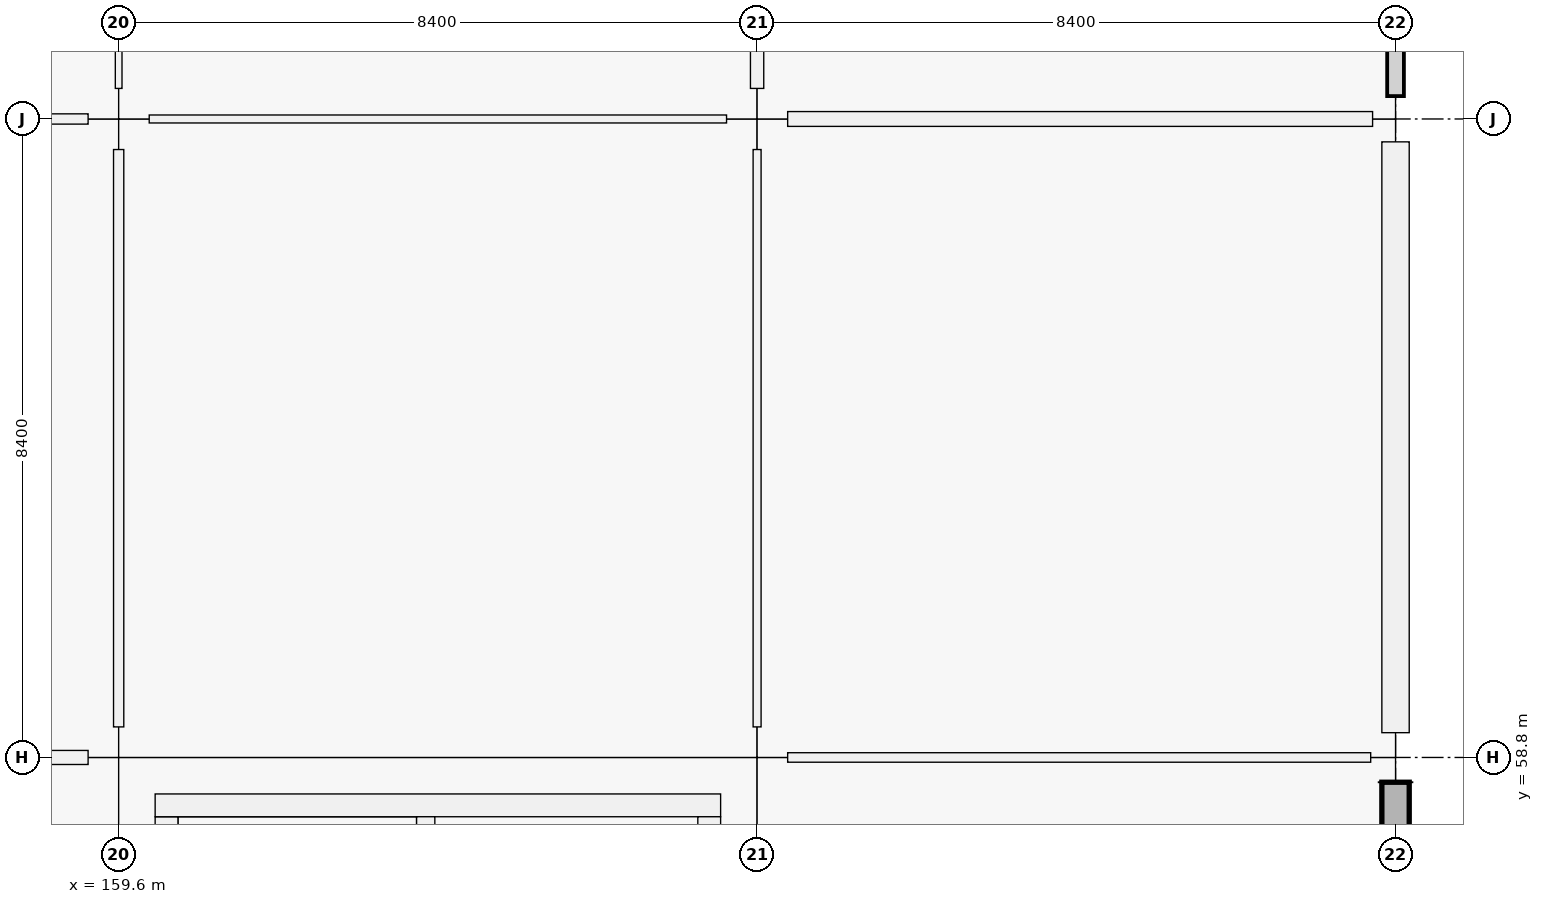
"""IFC4 building model, lengths in metres.
Left out: names, types, materials, properties, quantities, classifications, styles, units other than length and angle.
Written with IfcOpenShell. Run it as: python <this file> out.ifc"""

import sys

from ifc_helpers import new_model, si_unit, direction, frame, frame_2d, origin, origin_2d, place, context, subcontext, project, spatial, rectangle, extrude, element, fill, save


model = new_model("IFC4")
c1 = context("Model", 3, precision=1e-05, world=origin(), true_north=direction((0.0, 1.0)))
c2 = subcontext(c1, "Body", "Model", "MODEL_VIEW")
j1 = project(units=[si_unit("LENGTHUNIT", "METRE"), si_unit("PLANEANGLEUNIT", "RADIAN")], contexts=[c1])
p1 = place(None, origin())
s1 = spatial("IfcSite", under=j1, at=p1, CompositionType="ELEMENT")
p2 = place(p1, origin())
s2 = spatial("IfcBuilding", under=s1, at=p2, CompositionType="ELEMENT")
p3 = place(p2, origin())
s3 = spatial("IfcBuildingStorey", under=s2, at=p3, CompositionType="ELEMENT", Elevation=0.0)
for number, where, z_axis, x_axis in (
    (1, (159.6, 58.8, 0.0), (0.0, 0.0, 1.0), (1.0, 0.0, 0.0)),
    (2, (159.6, 67.2, 0.0), (0.0, 0.0, 1.0), (1.0, 0.0, 0.0)),
    (3, (168.0, 58.8, 0.0), (0.0, 0.0, 1.0), (1.0, 0.0, 0.0)),
    (4, (168.0, 67.2, 0.0), (0.0, 0.0, 1.0), (1.0, 0.0, 0.0)),
):
    element("IfcColumn", number, at=place(p3, frame(where, z_axis=z_axis, x_axis=x_axis)), inside=s3, PredefinedType="COLUMN", context=c2, shape_type="SweptSolid", body=[
        extrude(rectangle(XDim=0.8, YDim=0.8, at=origin_2d()), origin(), (0.0, 0.0, 1.0), 5.76),
    ])
p4 = place(p3, frame((176.4, 58.8, 0.0), z_axis=(0.0, 0.0, 1.0), x_axis=(1.0, 0.0, 0.0)))
e5 = element("IfcColumn", 5, at=p4, inside=s3, PredefinedType="COLUMN", context=c2, shape_type="SweptSolid", body=[
    extrude(rectangle(XDim=0.65, YDim=0.65, at=origin_2d()), origin(), (0.0, 0.0, 1.0), 5.76),
])
p5 = place(p3, frame((176.4, 67.2, 0.0), z_axis=(0.0, 0.0, 1.0), x_axis=(1.0, 0.0, 0.0)))
e6 = element("IfcColumn", 6, at=p5, inside=s3, PredefinedType="COLUMN", context=c2, shape_type="SweptSolid", body=[
    extrude(rectangle(XDim=0.6, YDim=0.6, at=origin_2d()), origin(), (0.0, 0.0, 1.0), 5.76),
])
p6 = place(p3, frame((176.4, 58.474, 0.0), z_axis=(0.0, 0.0, 1.0), x_axis=(0.0, -1.0, 0.0)))
e7 = element("IfcWall", 7, at=p6, inside=s3, PredefinedType="SOLIDWALL", context=c2, shape_type="SweptSolid", body=[
    extrude(rectangle(XDim=7.773, YDim=0.36, at=frame_2d((3.887, 0.0))), origin(), (0.0, 0.0, 1.0), 4.7),
])
p7 = place(p6, frame((2.886, 0.0, 0.0)))
e8 = element("IfcOpeningElement", 8, at=p7, cuts=e7, PredefinedType="OPENING", context=c2, shape_type="SweptSolid", body=[
    extrude(rectangle(XDim=2.0, YDim=2.25, at=frame_2d((1.0, 1.125))), frame((0.0, 0.18, 0.0), z_axis=(0.0, -1.0, 0.0), x_axis=(1.0, 0.0, 0.0)), (0.0, 0.0, 1.0), 0.36),
])
p8 = place(p6, frame((5.624, 0.0, 0.0)))
e9 = element("IfcOpeningElement", 9, at=p8, cuts=e7, PredefinedType="OPENING", context=c2, shape_type="SweptSolid", body=[
    extrude(rectangle(XDim=2.0, YDim=2.25, at=frame_2d((1.0, 1.125))), frame((0.0, 0.18, 0.0), z_axis=(0.0, -1.0, 0.0), x_axis=(1.0, 0.0, 0.0)), (0.0, 0.0, 1.0), 0.36),
])
p9 = place(p3, frame((176.4, 66.899, 0.0), z_axis=(0.0, 0.0, 1.0), x_axis=(0.0, -1.0, 0.0)))
e10 = element("IfcWall", 10, at=p9, inside=s3, PredefinedType="SOLIDWALL", context=c2, shape_type="SweptSolid", body=[
    extrude(rectangle(XDim=7.773, YDim=0.36, at=frame_2d((3.886, 0.0))), origin(), (0.0, 0.0, 1.0), 4.7),
])
p10 = place(p9, frame((3.286, 0.0, 0.9)))
e11 = element("IfcOpeningElement", 11, at=p10, cuts=e10, PredefinedType="OPENING", context=c2, shape_type="SweptSolid", body=[
    extrude(rectangle(XDim=1.2, YDim=2.1, at=frame_2d((0.6, 1.05))), frame((0.0, 0.18, 0.0), z_axis=(0.0, -1.0, 0.0), x_axis=(1.0, 0.0, 0.0)), (0.0, 0.0, 1.0), 0.36),
])
p11 = place(p3, frame((160.23, 51.18, 0.0), z_axis=(0.0, 0.0, 1.0), x_axis=(0.0, 1.0, 0.0)))
e12 = element("IfcWall", 12, at=p11, inside=s3, PredefinedType="SHEAR", context=c2, shape_type="SweptSolid", body=[
    extrude(rectangle(XDim=6.84, YDim=0.3, at=frame_2d((3.42, 0.0))), origin(), (0.0, 0.0, 1.0), 5.76),
])
p12 = place(p3, frame((160.08, 58.17, 0.0), z_axis=(0.0, 0.0, 1.0), x_axis=(1.0, 0.0, 0.0)))
e13 = element("IfcWall", 13, at=p12, inside=s3, PredefinedType="SHEAR", context=c2, shape_type="SweptSolid", body=[
    extrude(rectangle(XDim=7.44, YDim=0.3, at=frame_2d((3.72, 0.0))), origin(), (0.0, 0.0, 1.0), 5.76),
])
p13 = place(p3, frame((167.37, 58.02, 0.0), z_axis=(0.0, 0.0, 1.0), x_axis=(0.0, -1.0, 0.0)))
e14 = element("IfcWall", 14, at=p13, inside=s3, PredefinedType="SHEAR", context=c2, shape_type="SweptSolid", body=[
    extrude(rectangle(XDim=6.84, YDim=0.3, at=frame_2d((3.42, 0.0))), origin(), (0.0, 0.0, 1.0), 5.76),
])
p14 = place(p13, frame((5.12, 0.0, 0.0)))
e15 = element("IfcOpeningElement", 15, at=p14, cuts=e14, PredefinedType="OPENING", context=c2, shape_type="SweptSolid", body=[
    extrude(rectangle(XDim=1.5, YDim=2.15, at=frame_2d((0.75, 1.075))), frame((0.0, 0.15, 0.0), z_axis=(0.0, -1.0, 0.0), x_axis=(1.0, 0.0, 0.0)), (0.0, 0.0, 1.0), 0.3),
])
p15 = place(p3, frame((163.64, 51.18, 0.0), z_axis=(0.0, 0.0, 1.0), x_axis=(0.0, 1.0, 0.0)))
e16 = element("IfcWall", 16, at=p15, inside=s3, PredefinedType="SHEAR", context=c2, shape_type="SweptSolid", body=[
    extrude(rectangle(XDim=6.84, YDim=0.24, at=frame_2d((3.42, 0.0))), origin(), (0.0, 0.0, 1.0), 5.76),
])
p16 = place(p15, frame((0.12, 0.0, 0.0)))
e17 = element("IfcOpeningElement", 17, at=p16, cuts=e16, PredefinedType="OPENING", context=c2, shape_type="SweptSolid", body=[
    extrude(rectangle(XDim=1.0, YDim=2.15, at=frame_2d((0.5, 1.075))), frame((0.0, 0.12, 0.0), z_axis=(0.0, -1.0, 0.0), x_axis=(1.0, 0.0, 0.0)), (0.0, 0.0, 1.0), 0.24),
])
p17 = place(p3, frame((151.602, 58.8, 0.0), z_axis=(0.0, 0.0, 1.0), x_axis=(1.0, 0.0, 0.0)))
e18 = element("IfcWall", 18, at=p17, inside=s3, PredefinedType="PARTITIONING", context=c2, shape_type="SweptSolid", body=[
    extrude(rectangle(XDim=7.596, YDim=0.185, at=frame_2d((3.798, 0.0))), origin(), (0.0, 0.0, 1.0), 3.66),
])
p18 = place(p17, frame((3.318, 0.0, 0.0)))
e19 = element("IfcOpeningElement", 19, at=p18, cuts=e18, PredefinedType="OPENING", context=c2, shape_type="SweptSolid", body=[
    extrude(rectangle(XDim=0.96, YDim=2.18, at=frame_2d((0.48, 1.09))), frame((0.0, 0.093, 0.0), z_axis=(0.0, -1.0, 0.0), x_axis=(1.0, 0.0, 0.0)), (0.0, 0.0, 1.0), 0.185),
])
p19 = place(p3, frame((151.602, 67.2, 0.0), z_axis=(0.0, 0.0, 1.0), x_axis=(1.0, 0.0, 0.0)))
e20 = element("IfcWall", 20, at=p19, inside=s3, PredefinedType="PARTITIONING", context=c2, shape_type="SweptSolid", body=[
    extrude(rectangle(XDim=7.596, YDim=0.135, at=frame_2d((3.798, 0.0))), origin(), (0.0, 0.0, 1.0), 3.66),
])
p20 = place(p19, frame((3.328, 0.0, 0.0)))
e21 = element("IfcOpeningElement", 21, at=p20, cuts=e20, PredefinedType="OPENING", context=c2, shape_type="SweptSolid", body=[
    extrude(rectangle(XDim=0.94, YDim=2.15, at=frame_2d((0.47, 1.075))), frame((0.0, 0.067, 0.0), z_axis=(0.0, -1.0, 0.0), x_axis=(1.0, 0.0, 0.0)), (0.0, 0.0, 1.0), 0.135),
])
p21 = place(p3, frame((160.002, 67.2, 0.0), z_axis=(0.0, 0.0, 1.0), x_axis=(1.0, 0.0, 0.0)))
e22 = element("IfcWall", 22, at=p21, inside=s3, PredefinedType="PARTITIONING", context=c2, shape_type="SweptSolid", body=[
    extrude(rectangle(XDim=7.596, YDim=0.105, at=frame_2d((3.798, 0.0))), origin(), (0.0, 0.0, 1.0), 3.66),
])
p22 = place(p21, frame((3.273, 0.0, 0.0)))
e23 = element("IfcOpeningElement", 23, at=p22, cuts=e22, PredefinedType="OPENING", context=c2, shape_type="SweptSolid", body=[
    extrude(rectangle(XDim=1.05, YDim=2.12, at=frame_2d((0.525, 1.06))), frame((0.0, 0.052, 0.0), z_axis=(0.0, -1.0, 0.0), x_axis=(1.0, 0.0, 0.0)), (0.0, 0.0, 1.0), 0.105),
])
p23 = place(p3, frame((168.402, 58.8, 0.0), z_axis=(0.0, 0.0, 1.0), x_axis=(1.0, 0.0, 0.0)))
e24 = element("IfcWall", 24, at=p23, inside=s3, PredefinedType="PARTITIONING", context=c2, shape_type="SweptSolid", body=[
    extrude(rectangle(XDim=7.671, YDim=0.125, at=frame_2d((3.835, 0.0))), origin(), (0.0, 0.0, 1.0), 3.66),
])
p24 = place(p23, frame((3.306, 0.0, 0.0)))
e25 = element("IfcOpeningElement", 25, at=p24, cuts=e24, PredefinedType="OPENING", context=c2, shape_type="SweptSolid", body=[
    extrude(rectangle(XDim=1.06, YDim=2.25, at=frame_2d((0.53, 1.125))), frame((0.0, 0.062, 0.0), z_axis=(0.0, -1.0, 0.0), x_axis=(1.0, 0.0, 0.0)), (0.0, 0.0, 1.0), 0.125),
])
p25 = place(p3, frame((168.402, 67.2, 0.0), z_axis=(0.0, 0.0, 1.0), x_axis=(1.0, 0.0, 0.0)))
e26 = element("IfcWall", 26, at=p25, inside=s3, PredefinedType="PARTITIONING", context=c2, shape_type="SweptSolid", body=[
    extrude(rectangle(XDim=7.696, YDim=0.195, at=frame_2d((3.848, 0.0))), origin(), (0.0, 0.0, 1.0), 3.66),
])
p26 = place(p25, frame((3.328, 0.0, 0.0)))
e27 = element("IfcOpeningElement", 27, at=p26, cuts=e26, PredefinedType="OPENING", context=c2, shape_type="SweptSolid", body=[
    extrude(rectangle(XDim=1.04, YDim=2.2, at=frame_2d((0.52, 1.1))), frame((0.0, 0.098, 0.0), z_axis=(0.0, -1.0, 0.0), x_axis=(1.0, 0.0, 0.0)), (0.0, 0.0, 1.0), 0.195),
])
p27 = place(p3, frame((159.6, 59.202, 0.0), z_axis=(0.0, 0.0, 1.0), x_axis=(0.0, 1.0, 0.0)))
e28 = element("IfcWall", 28, at=p27, inside=s3, PredefinedType="PARTITIONING", context=c2, shape_type="SweptSolid", body=[
    extrude(rectangle(XDim=7.596, YDim=0.135, at=frame_2d((3.798, 0.0))), origin(), (0.0, 0.0, 1.0), 3.66),
])
p28 = place(p27, frame((3.288, 0.0, 0.0)))
e29 = element("IfcOpeningElement", 29, at=p28, cuts=e28, PredefinedType="OPENING", context=c2, shape_type="SweptSolid", body=[
    extrude(rectangle(XDim=1.02, YDim=2.2, at=frame_2d((0.51, 1.1))), frame((0.0, 0.067, 0.0), z_axis=(0.0, -1.0, 0.0), x_axis=(1.0, 0.0, 0.0)), (0.0, 0.0, 1.0), 0.135),
])
p29 = place(p3, frame((159.6, 67.602, 0.0), z_axis=(0.0, 0.0, 1.0), x_axis=(0.0, 1.0, 0.0)))
e30 = element("IfcWall", 30, at=p29, inside=s3, PredefinedType="PARTITIONING", context=c2, shape_type="SweptSolid", body=[
    extrude(rectangle(XDim=7.671, YDim=0.088, at=frame_2d((3.835, 0.0))), origin(), (0.0, 0.0, 1.0), 3.66),
])
p30 = place(p29, frame((3.331, 0.0, 0.0)))
e31 = element("IfcOpeningElement", 31, at=p30, cuts=e30, PredefinedType="OPENING", context=c2, shape_type="SweptSolid", body=[
    extrude(rectangle(XDim=1.01, YDim=2.12, at=frame_2d((0.505, 1.06))), frame((0.0, 0.044, 0.0), z_axis=(0.0, -1.0, 0.0), x_axis=(1.0, 0.0, 0.0)), (0.0, 0.0, 1.0), 0.088),
])
p31 = place(p3, frame((168.0, 59.202, 0.0), z_axis=(0.0, 0.0, 1.0), x_axis=(0.0, 1.0, 0.0)))
e32 = element("IfcWall", 32, at=p31, inside=s3, PredefinedType="PARTITIONING", context=c2, shape_type="SweptSolid", body=[
    extrude(rectangle(XDim=7.596, YDim=0.105, at=frame_2d((3.798, 0.0))), origin(), (0.0, 0.0, 1.0), 3.66),
])
p32 = place(p31, frame((3.258, 0.0, 0.0)))
e33 = element("IfcOpeningElement", 33, at=p32, cuts=e32, PredefinedType="OPENING", context=c2, shape_type="SweptSolid", body=[
    extrude(rectangle(XDim=1.08, YDim=2.25, at=frame_2d((0.54, 1.125))), frame((0.0, 0.052, 0.0), z_axis=(0.0, -1.0, 0.0), x_axis=(1.0, 0.0, 0.0)), (0.0, 0.0, 1.0), 0.105),
])
p33 = place(p3, frame((168.0, 67.602, 0.0), z_axis=(0.0, 0.0, 1.0), x_axis=(0.0, 1.0, 0.0)))
e34 = element("IfcWall", 34, at=p33, inside=s3, PredefinedType="PARTITIONING", context=c2, shape_type="SweptSolid", body=[
    extrude(rectangle(XDim=7.696, YDim=0.175, at=frame_2d((3.848, 0.0))), origin(), (0.0, 0.0, 1.0), 3.66),
])
p34 = place(p33, frame((3.318, 0.0, 0.0)))
e35 = element("IfcOpeningElement", 35, at=p34, cuts=e34, PredefinedType="OPENING", context=c2, shape_type="SweptSolid", body=[
    extrude(rectangle(XDim=1.06, YDim=2.25, at=frame_2d((0.53, 1.125))), frame((0.0, 0.087, 0.0), z_axis=(0.0, -1.0, 0.0), x_axis=(1.0, 0.0, 0.0)), (0.0, 0.0, 1.0), 0.175),
])
p35 = place(p10, origin())
e36 = element("IfcWindow", 36, at=p35, inside=s3, PartitioningType="SINGLE_PANEL", PredefinedType="WINDOW", context=c2, shape_type="SweptSolid", body=[
    extrude(rectangle(XDim=1.2, YDim=2.1, at=frame_2d((0.6, 1.05))), frame((0.0, 0.03, 0.0), z_axis=(0.0, -1.0, 0.0), x_axis=(1.0, 0.0, 0.0)), (0.0, 0.0, 1.0), 0.06),
])
fill(e11, e36)
p36 = place(p22, origin())
e37 = element("IfcDoor", 37, at=p36, inside=s3, OperationType="SINGLE_SWING_RIGHT", PredefinedType="DOOR", context=c2, shape_type="SweptSolid", body=[
    extrude(rectangle(XDim=1.05, YDim=2.12, at=frame_2d((0.525, 1.06))), frame((0.0, 0.025, 0.0), z_axis=(0.0, -1.0, 0.0), x_axis=(1.0, 0.0, 0.0)), (0.0, 0.0, 1.0), 0.05),
])
fill(e23, e37)
p37 = place(p24, origin())
e38 = element("IfcDoor", 38, at=p37, inside=s3, OperationType="SINGLE_SWING_LEFT", PredefinedType="DOOR", context=c2, shape_type="SweptSolid", body=[
    extrude(rectangle(XDim=1.06, YDim=2.25, at=frame_2d((0.53, 1.125))), frame((0.0, 0.025, 0.0), z_axis=(0.0, -1.0, 0.0), x_axis=(1.0, 0.0, 0.0)), (0.0, 0.0, 1.0), 0.05),
])
fill(e25, e38)
p38 = place(p26, origin())
e39 = element("IfcDoor", 39, at=p38, inside=s3, OperationType="SINGLE_SWING_RIGHT", PredefinedType="DOOR", context=c2, shape_type="SweptSolid", body=[
    extrude(rectangle(XDim=1.04, YDim=2.2, at=frame_2d((0.52, 1.1))), frame((0.0, 0.025, 0.0), z_axis=(0.0, -1.0, 0.0), x_axis=(1.0, 0.0, 0.0)), (0.0, 0.0, 1.0), 0.05),
])
fill(e27, e39)
p39 = place(p28, origin())
e40 = element("IfcDoor", 40, at=p39, inside=s3, OperationType="SINGLE_SWING_LEFT", PredefinedType="DOOR", context=c2, shape_type="SweptSolid", body=[
    extrude(rectangle(XDim=1.02, YDim=2.2, at=frame_2d((0.51, 1.1))), frame((0.0, 0.025, 0.0), z_axis=(0.0, -1.0, 0.0), x_axis=(1.0, 0.0, 0.0)), (0.0, 0.0, 1.0), 0.05),
])
fill(e29, e40)
p40 = place(p32, origin())
e41 = element("IfcDoor", 41, at=p40, inside=s3, OperationType="SINGLE_SWING_LEFT", PredefinedType="DOOR", context=c2, shape_type="SweptSolid", body=[
    extrude(rectangle(XDim=1.08, YDim=2.25, at=frame_2d((0.54, 1.125))), frame((0.0, 0.025, 0.0), z_axis=(0.0, -1.0, 0.0), x_axis=(1.0, 0.0, 0.0)), (0.0, 0.0, 1.0), 0.05),
])
fill(e33, e41)
save(model, sys.argv[1])
